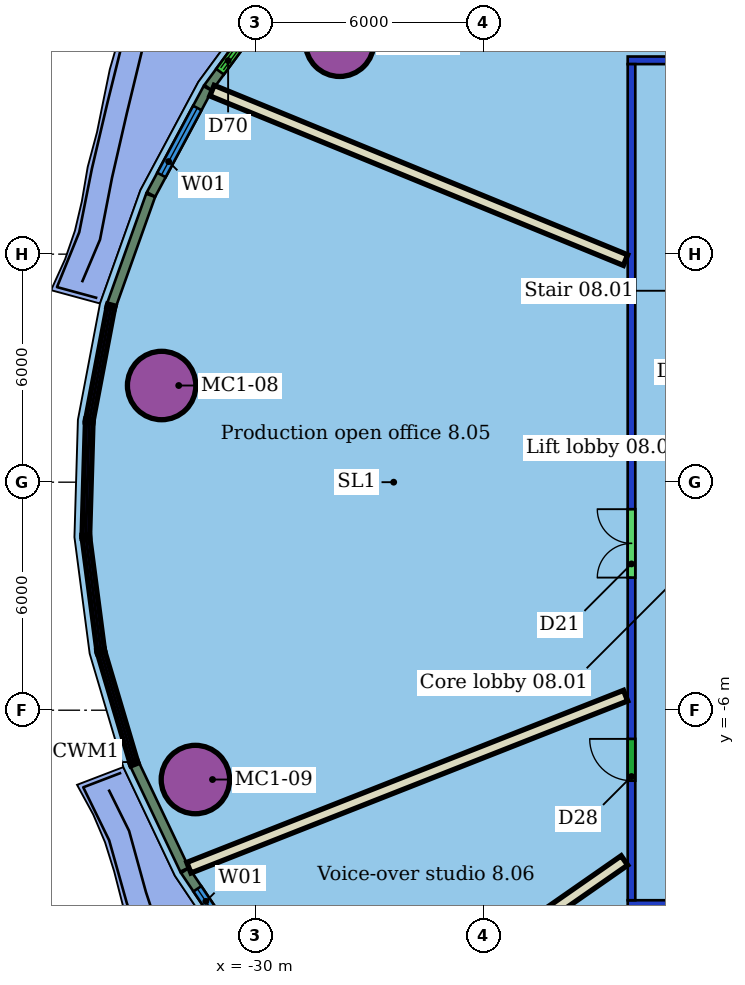
"""IFC4 building model, lengths in metres.
Left out: names, types, materials, properties, quantities, classifications, styles, units other than length and angle.
Written with IfcOpenShell. Run it as: python <this file> out.ifc"""

import sys

from ifc_helpers import new_model, si_unit, direction, frame, frame_2d, origin, origin_2d, place, context, subcontext, project, spatial, rectangle, hollow_circle, extrude, element, fill, save


model = new_model("IFC4")
c1 = context("Model", 3, precision=1e-05, world=origin(), true_north=direction((0.0, 1.0)))
c2 = subcontext(c1, "Body", "Model", "MODEL_VIEW")
j1 = project(units=[si_unit("LENGTHUNIT", "METRE"), si_unit("PLANEANGLEUNIT", "RADIAN")], contexts=[c1])
p1 = place(None, origin())
s1 = spatial("IfcSite", under=j1, at=p1, CompositionType="ELEMENT")
p2 = place(p1, origin())
s2 = spatial("IfcBuilding", under=s1, at=p2, CompositionType="ELEMENT")
p3 = place(p2, frame((0.0, 0.0, 47.1)))
s3 = spatial("IfcBuildingStorey", under=s2, at=p3, CompositionType="ELEMENT", Elevation=47.1)
for number, where, z_axis, x_axis in (
    (1, (-27.78, 11.576, 0.0), (0.0, 0.0, 1.0), (1.0, 0.0, 0.0)),
    (2, (-32.464, 2.543, 0.0), (0.0, 0.0, 1.0), (1.0, 0.0, 0.0)),
    (3, (-31.575, -7.824, 0.0), (0.0, 0.0, 1.0), (1.0, 0.0, 0.0)),
):
    element("IfcColumn", number, at=place(p3, frame(where, z_axis=z_axis, x_axis=x_axis)), inside=s3, PredefinedType="COLUMN", context=c2, shape_type="SweptSolid", body=[
        extrude(hollow_circle(Radius=0.9, WallThickness=0.06, at=origin_2d()), origin(), (0.0, 0.0, 1.0), 3.55),
    ])
p4 = place(p3, frame((8.2, -11.1, 0.0), z_axis=(0.0, 0.0, 1.0), x_axis=(-1.0, 0.0, 0.0)))
e4 = element("IfcWall", 4, at=p4, inside=s3, PredefinedType="PARTITIONING", context=c2, shape_type="SweptSolid", body=[
    extrude(rectangle(XDim=28.4, YDim=0.2, at=frame_2d((14.2, 0.0))), origin(), (0.0, 0.0, 1.0), 2.85),
])
p5 = place(p4, frame((25.038, 0.0, 0.0)))
e5 = element("IfcOpeningElement", 5, at=p5, cuts=e4, PredefinedType="OPENING", context=c2, shape_type="SweptSolid", body=[
    extrude(rectangle(XDim=1.0, YDim=2.1, at=frame_2d((0.5, 1.05))), frame((0.0, 0.11, 0.0), z_axis=(0.0, -1.0, 0.0), x_axis=(1.0, 0.0, 0.0)), (0.0, 0.0, 1.0), 0.22),
])
p6 = place(p4, frame((18.73, 0.0, 0.0)))
e6 = element("IfcOpeningElement", 6, at=p6, cuts=e4, PredefinedType="OPENING", context=c2, shape_type="SweptSolid", body=[
    extrude(rectangle(XDim=1.8, YDim=2.1, at=frame_2d((0.9, 1.05))), frame((0.0, 0.11, 0.0), z_axis=(0.0, -1.0, 0.0), x_axis=(1.0, 0.0, 0.0)), (0.0, 0.0, 1.0), 0.22),
])
p7 = place(p4, frame((8.223, 0.0, 0.0)))
e7 = element("IfcOpeningElement", 7, at=p7, cuts=e4, PredefinedType="OPENING", context=c2, shape_type="SweptSolid", body=[
    extrude(rectangle(XDim=0.9, YDim=2.1, at=frame_2d((0.45, 1.05))), frame((0.0, 0.11, 0.0), z_axis=(0.0, -1.0, 0.0), x_axis=(1.0, 0.0, 0.0)), (0.0, 0.0, 1.0), 0.22),
])
p8 = place(p3, frame((-20.1, -11.0, 0.0), z_axis=(0.0, 0.0, 1.0), x_axis=(0.0, 1.0, 0.0)))
e8 = element("IfcWall", 8, at=p8, inside=s3, PredefinedType="PARTITIONING", context=c2, shape_type="SweptSolid", body=[
    extrude(rectangle(XDim=22.0, YDim=0.2, at=frame_2d((11.0, 0.0))), origin(), (0.0, 0.0, 1.0), 2.85),
])
p9 = place(p8, frame((8.49, 0.0, 0.0)))
e9 = element("IfcOpeningElement", 9, at=p9, cuts=e8, PredefinedType="OPENING", context=c2, shape_type="SweptSolid", body=[
    extrude(rectangle(XDim=1.8, YDim=2.1, at=frame_2d((0.9, 1.05))), frame((0.0, 0.11, 0.0), z_axis=(0.0, -1.0, 0.0), x_axis=(1.0, 0.0, 0.0)), (0.0, 0.0, 1.0), 0.22),
])
p10 = place(p8, frame((3.146, 0.0, 0.0)))
e10 = element("IfcOpeningElement", 10, at=p10, cuts=e8, PredefinedType="OPENING", context=c2, shape_type="SweptSolid", body=[
    extrude(rectangle(XDim=1.1, YDim=2.1, at=frame_2d((0.55, 1.05))), frame((0.0, 0.11, 0.0), z_axis=(0.0, -1.0, 0.0), x_axis=(1.0, 0.0, 0.0)), (0.0, 0.0, 1.0), 0.22),
])
p11 = place(p3, frame((-20.2, 11.1, 0.0), z_axis=(0.0, 0.0, 1.0), x_axis=(1.0, 0.0, 0.0)))
e11 = element("IfcWall", 11, at=p11, inside=s3, PredefinedType="PARTITIONING", context=c2, shape_type="SweptSolid", body=[
    extrude(rectangle(XDim=28.4, YDim=0.2, at=frame_2d((14.2, 0.0))), origin(), (0.0, 0.0, 1.0), 2.85),
])
p12 = place(p11, frame((19.669, 0.0, 0.0)))
e12 = element("IfcOpeningElement", 12, at=p12, cuts=e11, PredefinedType="OPENING", context=c2, shape_type="SweptSolid", body=[
    extrude(rectangle(XDim=1.2, YDim=2.1, at=frame_2d((0.6, 1.05))), frame((0.0, 0.11, 0.0), z_axis=(0.0, -1.0, 0.0), x_axis=(1.0, 0.0, 0.0)), (0.0, 0.0, 1.0), 0.22),
])
p13 = place(p11, frame((10.757, 0.0, 0.0)))
e13 = element("IfcOpeningElement", 13, at=p13, cuts=e11, PredefinedType="OPENING", context=c2, shape_type="SweptSolid", body=[
    extrude(rectangle(XDim=1.5, YDim=2.1, at=frame_2d((0.75, 1.05))), frame((0.0, 0.11, 0.0), z_axis=(0.0, -1.0, 0.0), x_axis=(1.0, 0.0, 0.0)), (0.0, 0.0, 1.0), 0.22),
])
p14 = place(p11, frame((5.946, 0.0, 0.0)))
e14 = element("IfcOpeningElement", 14, at=p14, cuts=e11, PredefinedType="OPENING", context=c2, shape_type="SweptSolid", body=[
    extrude(rectangle(XDim=1.1, YDim=2.1, at=frame_2d((0.55, 1.05))), frame((0.0, 0.11, 0.0), z_axis=(0.0, -1.0, 0.0), x_axis=(1.0, 0.0, 0.0)), (0.0, 0.0, 1.0), 0.22),
])
p15 = place(p3, frame((-31.139, 10.303, 0.0), z_axis=(0.0, 0.0, 1.0), x_axis=(0.925302392071, -0.379230119093, 0.0)))
e15 = element("IfcWall", 15, at=p15, inside=s3, PredefinedType="PARTITIONING", context=c2, shape_type="SweptSolid", body=[
    extrude(rectangle(XDim=11.76, YDim=0.3, at=frame_2d((5.88, 0.0))), origin(), (0.0, 0.0, 1.0), 3.55),
])
p16 = place(p3, frame((-31.747, -10.144, 0.0), z_axis=(0.0, 0.0, 1.0), x_axis=(0.930393072446, 0.366563406172, 0.0)))
e16 = element("IfcWall", 16, at=p16, inside=s3, PredefinedType="PARTITIONING", context=c2, shape_type="SweptSolid", body=[
    extrude(rectangle(XDim=12.352, YDim=0.3, at=frame_2d((6.176, 0.0))), origin(), (0.0, 0.0, 1.0), 3.55),
])
p17 = place(p3, frame((-27.799, -15.188, 0.0), z_axis=(0.0, 0.0, 1.0), x_axis=(0.820483813594, 0.571669757491, 0.0)))
e17 = element("IfcWall", 17, at=p17, inside=s3, PredefinedType="PARTITIONING", context=c2, shape_type="SweptSolid", body=[
    extrude(rectangle(XDim=9.157, YDim=0.3, at=frame_2d((4.578, 0.0))), origin(), (0.0, 0.0, 1.0), 3.55),
])
p18 = place(p3, frame((-29.316, 12.994, 0.0), z_axis=(0.0, 0.0, 1.0), x_axis=(-0.592218050456, -0.805777748957, 0.0)))
e18 = element("IfcWall", 18, at=p18, inside=s3, PredefinedType="SOLIDWALL", context=c2, shape_type="SweptSolid", body=[
    extrude(rectangle(XDim=3.244, YDim=0.25, at=frame_2d((1.622, 0.0))), origin(), (0.0, 0.0, 1.0), 3.15),
])
p19 = place(p18, frame((0.922, 0.0, 0.0)))
e19 = element("IfcOpeningElement", 19, at=p19, cuts=e18, PredefinedType="OPENING", context=c2, shape_type="SweptSolid", body=[
    extrude(rectangle(XDim=1.8, YDim=2.4, at=frame_2d((0.9, 1.2))), frame((0.0, 0.135, 0.0), z_axis=(0.0, -1.0, 0.0), x_axis=(1.0, 0.0, 0.0)), (0.0, 0.0, 1.0), 0.27),
])
p20 = place(p3, frame((-31.251, 10.358, 0.0), z_axis=(0.0, 0.0, 1.0), x_axis=(-0.47194273939, -0.88162920252, 0.0)))
e20 = element("IfcWall", 20, at=p20, inside=s3, PredefinedType="SOLIDWALL", context=c2, shape_type="SweptSolid", body=[
    extrude(rectangle(XDim=3.161, YDim=0.25, at=frame_2d((1.58, 0.0))), origin(), (0.0, 0.0, 1.0), 3.15),
])
p21 = place(p20, frame((0.58, 0.0, 0.8)))
e21 = element("IfcOpeningElement", 21, at=p21, cuts=e20, PredefinedType="OPENING", context=c2, shape_type="SweptSolid", body=[
    extrude(rectangle(XDim=2.0, YDim=2.2, at=frame_2d((1.0, 1.1))), frame((0.0, 0.135, 0.0), z_axis=(0.0, -1.0, 0.0), x_axis=(1.0, 0.0, 0.0)), (0.0, 0.0, 1.0), 0.27),
])
p22 = place(p3, frame((-32.753, 7.547, 0.0), z_axis=(0.0, 0.0, 1.0), x_axis=(-0.335758185924, -0.941948215448, 0.0)))
e22 = element("IfcWall", 22, at=p22, inside=s3, PredefinedType="SOLIDWALL", context=c2, shape_type="SweptSolid", body=[
    extrude(rectangle(XDim=3.05, YDim=0.25, at=frame_2d((1.525, 0.0))), origin(), (0.0, 0.0, 1.0), 3.15),
])
p23 = place(p3, frame((-33.168, -7.439, 0.0), z_axis=(0.0, 0.0, 1.0), x_axis=(0.428609341076, -0.903489918451, 0.0)))
e23 = element("IfcWall", 23, at=p23, inside=s3, PredefinedType="SOLIDWALL", context=c2, shape_type="SweptSolid", body=[
    extrude(rectangle(XDim=3.05, YDim=0.25, at=frame_2d((1.525, 0.0))), origin(), (0.0, 0.0, 1.0), 3.15),
])
p24 = place(p3, frame((-31.848, -10.217, 0.0), z_axis=(0.0, 0.0, 1.0), x_axis=(0.558028768247, -0.829821603605, 0.0)))
e24 = element("IfcWall", 24, at=p24, inside=s3, PredefinedType="SOLIDWALL", context=c2, shape_type="SweptSolid", body=[
    extrude(rectangle(XDim=3.161, YDim=0.25, at=frame_2d((1.581, 0.0))), origin(), (0.0, 0.0, 1.0), 3.15),
])
p25 = place(p24, frame((0.58, 0.0, 0.8)))
e25 = element("IfcOpeningElement", 25, at=p25, cuts=e24, PredefinedType="OPENING", context=c2, shape_type="SweptSolid", body=[
    extrude(rectangle(XDim=2.0, YDim=2.2, at=frame_2d((1.0, 1.1))), frame((0.0, 0.135, 0.0), z_axis=(0.0, -1.0, 0.0), x_axis=(1.0, 0.0, 0.0)), (0.0, 0.0, 1.0), 0.27),
])
p26 = place(p9, origin())
e26 = element("IfcDoor", 26, at=p26, inside=s3, OperationType="DOUBLE_DOOR_SINGLE_SWING", PredefinedType="DOOR", context=c2, shape_type="SweptSolid", body=[
    extrude(rectangle(XDim=1.8, YDim=2.1, at=frame_2d((0.9, 1.05))), frame((0.0, 0.025, 0.0), z_axis=(0.0, -1.0, 0.0), x_axis=(1.0, 0.0, 0.0)), (0.0, 0.0, 1.0), 0.05),
])
fill(e9, e26)
p27 = place(p10, origin())
e27 = element("IfcDoor", 27, at=p27, inside=s3, OperationType="SINGLE_SWING_RIGHT", PredefinedType="DOOR", context=c2, shape_type="SweptSolid", body=[
    extrude(rectangle(XDim=1.1, YDim=2.1, at=frame_2d((0.55, 1.05))), frame((0.0, 0.025, 0.0), z_axis=(0.0, -1.0, 0.0), x_axis=(1.0, 0.0, 0.0)), (0.0, 0.0, 1.0), 0.05),
])
fill(e10, e27)
p28 = place(p19, origin())
e28 = element("IfcDoor", 28, at=p28, inside=s3, OperationType="DOUBLE_DOOR_SLIDING", PredefinedType="DOOR", context=c2, shape_type="SweptSolid", body=[
    extrude(rectangle(XDim=1.8, YDim=2.4, at=frame_2d((0.9, 1.2))), frame((0.0, 0.025, 0.0), z_axis=(0.0, -1.0, 0.0), x_axis=(1.0, 0.0, 0.0)), (0.0, 0.0, 1.0), 0.05),
])
fill(e19, e28)
p29 = place(p21, origin())
e29 = element("IfcWindow", 29, at=p29, inside=s3, PartitioningType="SINGLE_PANEL", PredefinedType="WINDOW", context=c2, shape_type="SweptSolid", body=[
    extrude(rectangle(XDim=2.0, YDim=2.2, at=frame_2d((1.0, 1.1))), frame((0.0, 0.03, 0.0), z_axis=(0.0, -1.0, 0.0), x_axis=(1.0, 0.0, 0.0)), (0.0, 0.0, 1.0), 0.06),
])
fill(e21, e29)
p30 = place(p25, origin())
e30 = element("IfcWindow", 30, at=p30, inside=s3, PartitioningType="SINGLE_PANEL", PredefinedType="WINDOW", context=c2, shape_type="SweptSolid", body=[
    extrude(rectangle(XDim=2.0, YDim=2.2, at=frame_2d((1.0, 1.1))), frame((0.0, 0.03, 0.0), z_axis=(0.0, -1.0, 0.0), x_axis=(1.0, 0.0, 0.0)), (0.0, 0.0, 1.0), 0.06),
])
fill(e25, e30)
save(model, sys.argv[1])
